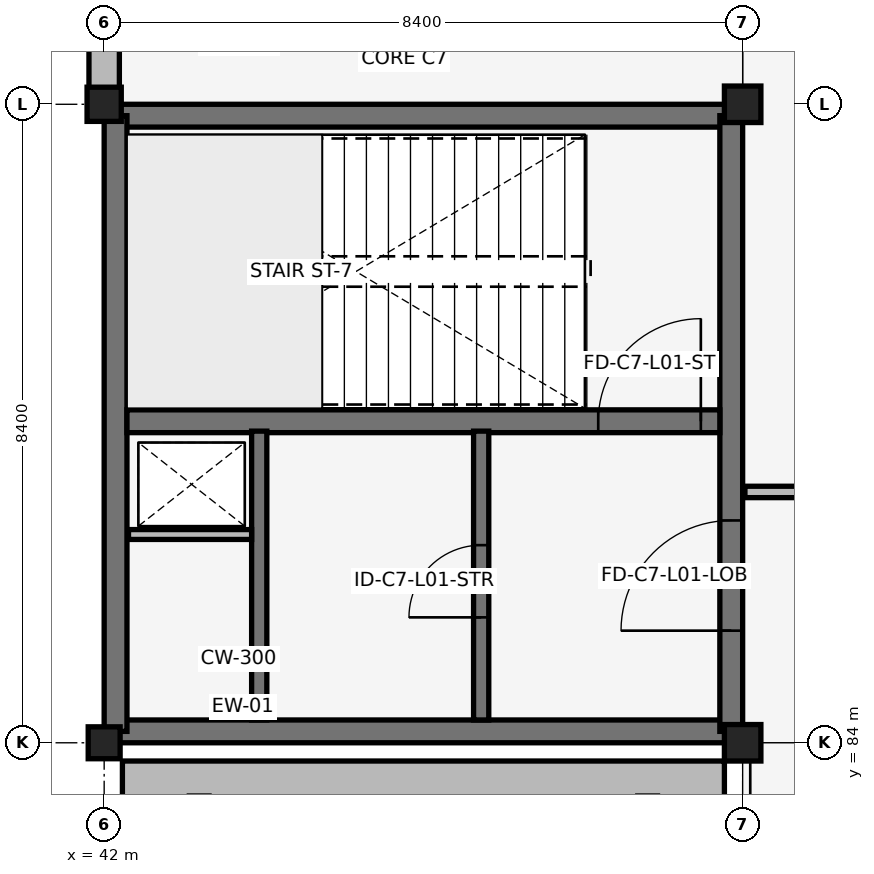
"""IFC4 building model, lengths in metres.
Left out: names, types, materials, properties, quantities, classifications, styles, units other than length and angle.
Written with IfcOpenShell. Run it as: python <this file> out.ifc"""

import sys

from ifc_helpers import new_model, si_unit, direction, frame, frame_2d, origin, origin_2d, place, context, subcontext, project, spatial, rectangle, extrude, element, fill, save


model = new_model("IFC4")
c1 = context("Model", 3, precision=1e-05, world=origin(), true_north=direction((0.0, 1.0)))
c2 = subcontext(c1, "Body", "Model", "MODEL_VIEW")
j1 = project(units=[si_unit("LENGTHUNIT", "METRE"), si_unit("PLANEANGLEUNIT", "RADIAN")], contexts=[c1])
p1 = place(None, origin())
s1 = spatial("IfcSite", under=j1, at=p1, CompositionType="ELEMENT")
p2 = place(p1, origin())
s2 = spatial("IfcBuilding", under=s1, at=p2, CompositionType="ELEMENT")
p3 = place(p2, frame((0.0, 0.0, 5.44)))
s3 = spatial("IfcBuildingStorey", under=s2, at=p3, CompositionType="ELEMENT", Elevation=5.44)
for number, where, z_axis, x_axis in (
    (1, (42.15, 84.15, 0.0), (0.0, 0.0, 1.0), (1.0, 0.0, 0.0)),
    (2, (42.15, 92.25, 0.0), (0.0, 0.0, 1.0), (1.0, 0.0, 0.0)),
    (3, (42.15, 84.15, 0.0), (0.0, 0.0, 1.0), (0.0, 1.0, 0.0)),
):
    element("IfcWall", number, at=place(p3, frame(where, z_axis=z_axis, x_axis=x_axis)), inside=s3, PredefinedType="SHEAR", context=c2, shape_type="SweptSolid", body=[
        extrude(rectangle(XDim=8.1, YDim=0.3, at=frame_2d((4.05, 0.0))), origin(), (0.0, 0.0, 1.0), 4.12),
    ])
p4 = place(p3, frame((50.25, 84.15, 0.0), z_axis=(0.0, 0.0, 1.0), x_axis=(0.0, 1.0, 0.0)))
e4 = element("IfcWall", 4, at=p4, inside=s3, PredefinedType="SHEAR", context=c2, shape_type="SweptSolid", body=[
    extrude(rectangle(XDim=8.1, YDim=0.3, at=frame_2d((4.05, 0.0))), origin(), (0.0, 0.0, 1.0), 4.12),
])
p5 = place(p4, frame((1.325, 0.0, 0.0)))
e5 = element("IfcOpeningElement", 5, at=p5, cuts=e4, PredefinedType="OPENING", context=c2, shape_type="SweptSolid", body=[
    extrude(rectangle(XDim=1.45, YDim=2.15, at=frame_2d((0.725, 1.075))), frame((0.0, 0.16, 0.0), z_axis=(0.0, -1.0, 0.0), x_axis=(1.0, 0.0, 0.0)), (0.0, 0.0, 1.0), 0.32),
])
p6 = place(p3, frame((42.3, 88.23, 0.0), z_axis=(0.0, 0.0, 1.0), x_axis=(1.0, 0.0, 0.0)))
e6 = element("IfcWall", 6, at=p6, inside=s3, PredefinedType="SHEAR", context=c2, shape_type="SweptSolid", body=[
    extrude(rectangle(XDim=7.8, YDim=0.3, at=frame_2d((3.9, 0.0))), origin(), (0.0, 0.0, 1.0), 4.12),
])
p7 = place(p6, frame((6.2, 0.0, 0.0)))
e7 = element("IfcOpeningElement", 7, at=p7, cuts=e6, PredefinedType="OPENING", context=c2, shape_type="SweptSolid", body=[
    extrude(rectangle(XDim=1.35, YDim=2.15, at=frame_2d((0.675, 1.075))), frame((0.0, 0.16, 0.0), z_axis=(0.0, -1.0, 0.0), x_axis=(1.0, 0.0, 0.0)), (0.0, 0.0, 1.0), 0.32),
])
p8 = place(p3, frame((42.0, 84.0, 0.0), z_axis=(0.0, 0.0, 1.0), x_axis=(1.0, 0.0, 0.0)))
e8 = element("IfcColumn", 8, at=p8, inside=s3, PredefinedType="COLUMN", context=c2, shape_type="SweptSolid", body=[
    extrude(rectangle(XDim=0.42, YDim=0.42, at=origin_2d()), origin(), (0.0, 0.0, 1.0), 4.12),
])
p9 = place(p3, frame((42.0, 92.4, 0.0), z_axis=(0.0, 0.0, 1.0), x_axis=(1.0, 0.0, 0.0)))
e9 = element("IfcColumn", 9, at=p9, inside=s3, PredefinedType="COLUMN", context=c2, shape_type="SweptSolid", body=[
    extrude(rectangle(XDim=0.45, YDim=0.45, at=origin_2d()), origin(), (0.0, 0.0, 1.0), 4.12),
])
for number, where, z_axis, x_axis in (
    (10, (50.4, 84.0, 0.0), (0.0, 0.0, 1.0), (1.0, 0.0, 0.0)),
    (11, (50.4, 92.4, 0.0), (0.0, 0.0, 1.0), (1.0, 0.0, 0.0)),
):
    element("IfcColumn", number, at=place(p3, frame(where, z_axis=z_axis, x_axis=x_axis)), inside=s3, PredefinedType="COLUMN", context=c2, shape_type="SweptSolid", body=[
        extrude(rectangle(XDim=0.48, YDim=0.48, at=origin_2d()), origin(), (0.0, 0.0, 1.0), 4.12),
    ])
p10 = place(p3, frame((42.24, 83.52, 0.0), z_axis=(0.0, 0.0, 1.0), x_axis=(1.0, 0.0, 0.0)))
e12 = element("IfcWall", 12, at=p10, inside=s3, PredefinedType="SOLIDWALL", context=c2, shape_type="SweptSolid", body=[
    extrude(rectangle(XDim=7.92, YDim=0.48, at=frame_2d((3.96, 0.0))), origin(), (0.0, 0.0, 1.0), 4.42),
])
p11 = place(p3, frame((42.0, 92.61, 0.0), z_axis=(0.0, 0.0, 1.0), x_axis=(0.0, 1.0, 0.0)))
e13 = element("IfcWall", 13, at=p11, inside=s3, PredefinedType="SOLIDWALL", context=c2, shape_type="SweptSolid", body=[
    extrude(rectangle(XDim=7.995, YDim=0.4, at=frame_2d((3.998, 0.0))), origin(), (0.0, 0.0, 1.0), 3.37),
])
p12 = place(p11, frame((1.144, 0.0, 0.7)))
e14 = element("IfcOpeningElement", 14, at=p12, cuts=e13, PredefinedType="OPENING", context=c2, shape_type="SweptSolid", body=[
    extrude(rectangle(XDim=0.75, YDim=2.1, at=frame_2d((0.375, 1.05))), frame((0.0, 0.21, 0.0), z_axis=(0.0, -1.0, 0.0), x_axis=(1.0, 0.0, 0.0)), (0.0, 0.0, 1.0), 0.42),
])
p13 = place(p11, frame((2.743, 0.0, 0.7)))
e15 = element("IfcOpeningElement", 15, at=p13, cuts=e13, PredefinedType="OPENING", context=c2, shape_type="SweptSolid", body=[
    extrude(rectangle(XDim=0.75, YDim=2.1, at=frame_2d((0.375, 1.05))), frame((0.0, 0.21, 0.0), z_axis=(0.0, -1.0, 0.0), x_axis=(1.0, 0.0, 0.0)), (0.0, 0.0, 1.0), 0.42),
])
p14 = place(p11, frame((4.502, 0.0, 0.7)))
e16 = element("IfcOpeningElement", 16, at=p14, cuts=e13, PredefinedType="OPENING", context=c2, shape_type="SweptSolid", body=[
    extrude(rectangle(XDim=0.75, YDim=2.1, at=frame_2d((0.375, 1.05))), frame((0.0, 0.21, 0.0), z_axis=(0.0, -1.0, 0.0), x_axis=(1.0, 0.0, 0.0)), (0.0, 0.0, 1.0), 0.42),
])
p15 = place(p11, frame((6.101, 0.0, 0.7)))
e17 = element("IfcOpeningElement", 17, at=p15, cuts=e13, PredefinedType="OPENING", context=c2, shape_type="SweptSolid", body=[
    extrude(rectangle(XDim=0.75, YDim=2.1, at=frame_2d((0.375, 1.05))), frame((0.0, 0.21, 0.0), z_axis=(0.0, -1.0, 0.0), x_axis=(1.0, 0.0, 0.0)), (0.0, 0.0, 1.0), 0.42),
])
p16 = place(p3, frame((46.96, 84.3, 0.0), z_axis=(0.0, 0.0, 1.0), x_axis=(0.0, 1.0, 0.0)))
e18 = element("IfcWall", 18, at=p16, inside=s3, PredefinedType="SHEAR", context=c2, shape_type="SweptSolid", body=[
    extrude(rectangle(XDim=3.8, YDim=0.2, at=frame_2d((1.9, 0.0))), origin(), (0.0, 0.0, 1.0), 3.38),
])
p17 = place(p16, frame((1.35, 0.0, 0.0)))
e19 = element("IfcOpeningElement", 19, at=p17, cuts=e18, PredefinedType="OPENING", context=c2, shape_type="SweptSolid", body=[
    extrude(rectangle(XDim=0.95, YDim=2.1, at=frame_2d((0.475, 1.05))), frame((0.0, 0.11, 0.0), z_axis=(0.0, -1.0, 0.0), x_axis=(1.0, 0.0, 0.0)), (0.0, 0.0, 1.0), 0.22),
])
p18 = place(p3, frame((44.04, 84.3, 0.0), z_axis=(0.0, 0.0, 1.0), x_axis=(0.0, 1.0, 0.0)))
e20 = element("IfcWall", 20, at=p18, inside=s3, PredefinedType="SHEAR", context=c2, shape_type="SweptSolid", body=[
    extrude(rectangle(XDim=3.8, YDim=0.2, at=frame_2d((1.9, 0.0))), origin(), (0.0, 0.0, 1.0), 3.38),
])
p19 = place(p3, frame((42.32, 86.74, 0.0), z_axis=(0.0, 0.0, 1.0), x_axis=(1.0, 0.0, 0.0)))
e21 = element("IfcWall", 21, at=p19, inside=s3, PredefinedType="PARTITIONING", context=c2, shape_type="SweptSolid", body=[
    extrude(rectangle(XDim=1.62, YDim=0.13, at=frame_2d((0.81, 0.0))), origin(), (0.0, 0.0, 1.0), 3.37),
])
p20 = place(p3, frame((50.43, 87.3, 0.0), z_axis=(0.0, 0.0, 1.0), x_axis=(1.0, 0.0, 0.0)))
e22 = element("IfcWall", 22, at=p20, inside=s3, PredefinedType="PARTITIONING", context=c2, shape_type="SweptSolid", body=[
    extrude(rectangle(XDim=24.82, YDim=0.15, at=frame_2d((12.41, 0.0))), origin(), (0.0, 0.0, 1.0), 3.47),
])
p21 = place(p20, frame((11.885, 0.0, 0.0)))
e23 = element("IfcOpeningElement", 23, at=p21, cuts=e22, PredefinedType="OPENING", context=c2, shape_type="SweptSolid", body=[
    extrude(rectangle(XDim=1.05, YDim=2.15, at=frame_2d((0.525, 1.075))), frame((0.0, 0.085, 0.0), z_axis=(0.0, -1.0, 0.0), x_axis=(1.0, 0.0, 0.0)), (0.0, 0.0, 1.0), 0.17),
])
p22 = place(p7, origin())
e24 = element("IfcDoor", 24, at=p22, inside=s3, OperationType="SINGLE_SWING_RIGHT", PredefinedType="DOOR", context=c2, shape_type="SweptSolid", body=[
    extrude(rectangle(XDim=1.35, YDim=2.15, at=frame_2d((0.675, 1.075))), frame((0.0, 0.025, 0.0), z_axis=(0.0, -1.0, 0.0), x_axis=(1.0, 0.0, 0.0)), (0.0, 0.0, 1.0), 0.05),
])
fill(e7, e24)
p23 = place(p17, origin())
e25 = element("IfcDoor", 25, at=p23, inside=s3, OperationType="SINGLE_SWING_LEFT", PredefinedType="DOOR", context=c2, shape_type="SweptSolid", body=[
    extrude(rectangle(XDim=0.95, YDim=2.1, at=frame_2d((0.475, 1.05))), frame((0.0, 0.025, 0.0), z_axis=(0.0, -1.0, 0.0), x_axis=(1.0, 0.0, 0.0)), (0.0, 0.0, 1.0), 0.05),
])
fill(e19, e25)
p24 = place(p5, origin())
e26 = element("IfcDoor", 26, at=p24, inside=s3, OperationType="DOUBLE_DOOR_SINGLE_SWING", PredefinedType="DOOR", context=c2, shape_type="SweptSolid", body=[
    extrude(rectangle(XDim=1.45, YDim=2.15, at=frame_2d((0.725, 1.075))), frame((0.0, 0.025, 0.0), z_axis=(0.0, -1.0, 0.0), x_axis=(1.0, 0.0, 0.0)), (0.0, 0.0, 1.0), 0.05),
])
fill(e5, e26)
save(model, sys.argv[1])
